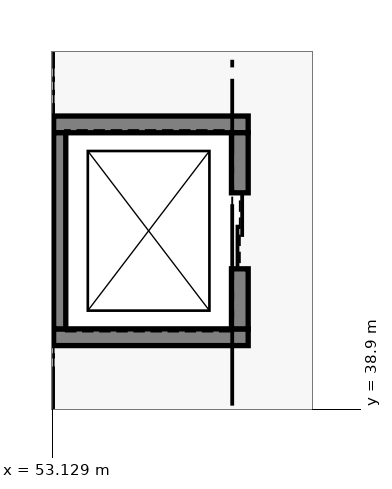
"""IFC4 building model, lengths in metres.
Left out: names, types, materials, properties, quantities, classifications, styles, units other than length and angle.
Written with IfcOpenShell. Run it as: python <this file> out.ifc"""

import sys

from ifc_helpers import new_model, si_unit, direction, frame, frame_2d, origin, place, context, subcontext, project, spatial, rectangle, extrude, element, fill, save


model = new_model("IFC4")
c1 = context("Model", 3, precision=1e-05, world=origin(), true_north=direction((0.0, 1.0)))
c2 = subcontext(c1, "Body", "Model", "MODEL_VIEW")
j1 = project(units=[si_unit("LENGTHUNIT", "METRE"), si_unit("PLANEANGLEUNIT", "RADIAN")], contexts=[c1])
p1 = place(None, origin())
s1 = spatial("IfcSite", under=j1, at=p1, CompositionType="ELEMENT")
p2 = place(p1, origin())
s2 = spatial("IfcBuilding", under=s1, at=p2, CompositionType="ELEMENT")
p3 = place(p2, frame((0.0, 0.0, 9.0)))
s3 = spatial("IfcBuildingStorey", under=s2, at=p3, CompositionType="ELEMENT", Elevation=9.0)
for number, where, z_axis, x_axis in (
    (1, (53.09, 39.85, 0.0), (0.0, 0.0, 1.0), (1.0, 0.0, 0.0)),
    (2, (53.09, 42.65, 0.0), (0.0, 0.0, 1.0), (1.0, 0.0, 0.0)),
):
    element("IfcWall", number, at=place(p3, frame(where, z_axis=z_axis, x_axis=x_axis)), inside=s3, PredefinedType="SOLIDWALL", context=c2, shape_type="SweptSolid", body=[
        extrude(rectangle(XDim=2.62, YDim=0.22, at=frame_2d((1.31, 0.0))), origin(), (0.0, 0.0, 1.0), 3.92),
    ])
p4 = place(p3, frame((53.2, 39.96, 0.0), z_axis=(0.0, 0.0, 1.0), x_axis=(0.0, 1.0, 0.0)))
e3 = element("IfcWall", 3, at=p4, inside=s3, PredefinedType="SOLIDWALL", context=c2, shape_type="SweptSolid", body=[
    extrude(rectangle(XDim=2.58, YDim=0.22, at=frame_2d((1.29, 0.0))), origin(), (0.0, 0.0, 1.0), 3.92),
])
p5 = place(p3, frame((55.6, 39.96, 0.0), z_axis=(0.0, 0.0, 1.0), x_axis=(0.0, 1.0, 0.0)))
e4 = element("IfcWall", 4, at=p5, inside=s3, PredefinedType="SOLIDWALL", context=c2, shape_type="SweptSolid", body=[
    extrude(rectangle(XDim=2.58, YDim=0.22, at=frame_2d((1.29, 0.0))), origin(), (0.0, 0.0, 1.0), 3.92),
])
p6 = place(p5, frame((0.79, 0.0, 0.0)))
e5 = element("IfcOpeningElement", 5, at=p6, cuts=e4, PredefinedType="OPENING", context=c2, shape_type="SweptSolid", body=[
    extrude(rectangle(XDim=1.0, YDim=2.15, at=frame_2d((0.5, 1.075))), frame((0.0, 0.12, 0.0), z_axis=(0.0, -1.0, 0.0), x_axis=(1.0, 0.0, 0.0)), (0.0, 0.0, 1.0), 0.24),
])
p7 = place(p6, origin())
e6 = element("IfcDoor", 6, at=p7, inside=s3, OperationType="SLIDING_TO_LEFT", PredefinedType="DOOR", context=c2, shape_type="SweptSolid", body=[
    extrude(rectangle(XDim=1.0, YDim=2.15, at=frame_2d((0.5, 1.075))), frame((0.0, 0.025, 0.0), z_axis=(0.0, -1.0, 0.0), x_axis=(1.0, 0.0, 0.0)), (0.0, 0.0, 1.0), 0.05),
])
fill(e5, e6)
save(model, sys.argv[1])
